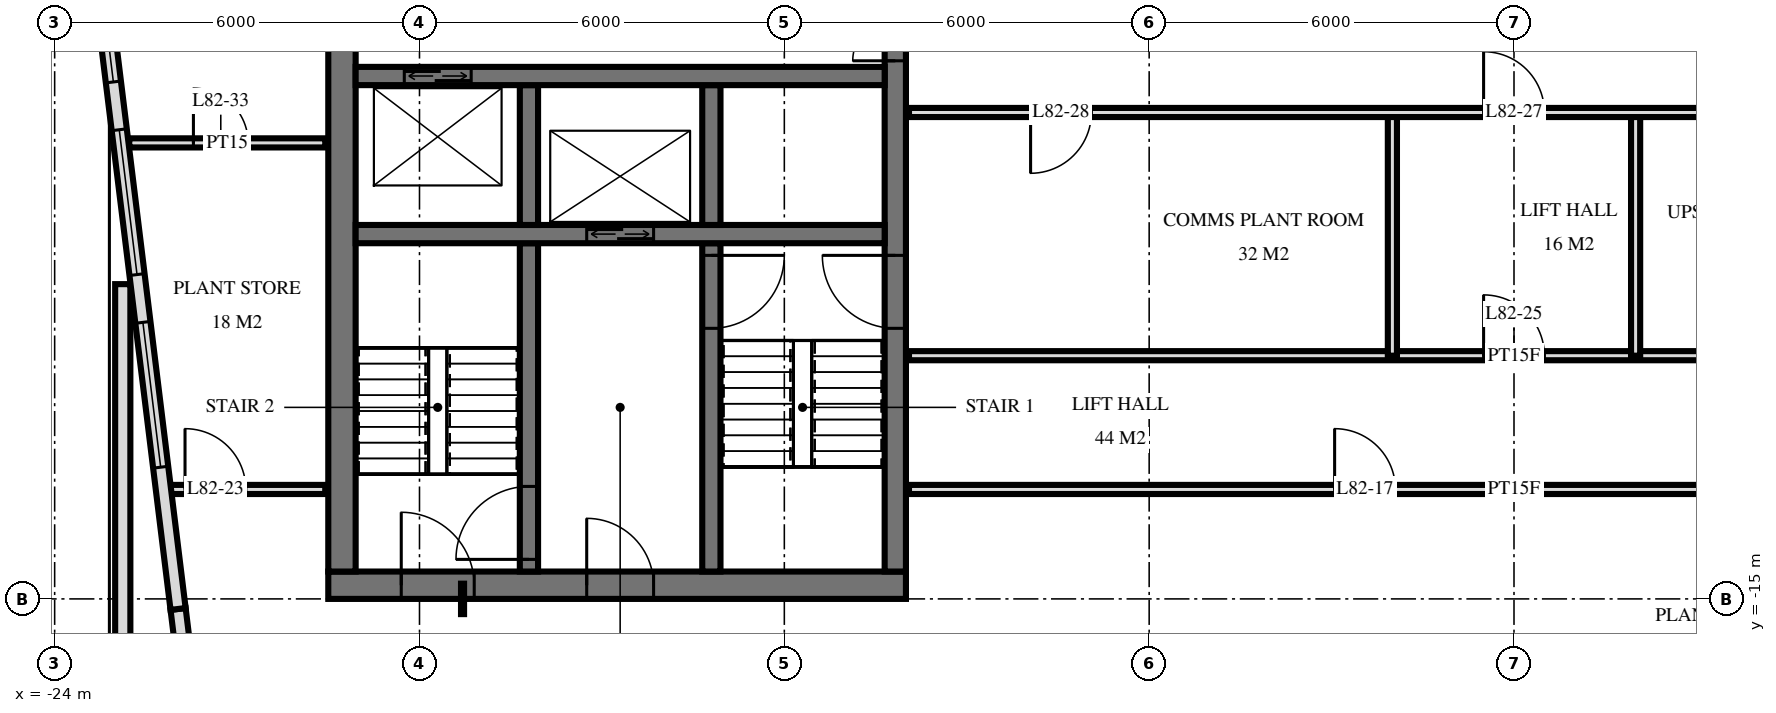
"""IFC4 building model, lengths in metres.
Left out: names, types, materials, properties, quantities, classifications, styles, units other than length and angle.
Written with IfcOpenShell. Run it as: python <this file> out.ifc"""

import sys

from ifc_helpers import new_model, si_unit, direction, frame, frame_2d, origin, place, context, subcontext, project, spatial, rectangle, extrude, element, fill, save


model = new_model("IFC4")
c1 = context("Model", 3, precision=1e-05, world=origin(), true_north=direction((0.0, 1.0)))
c2 = subcontext(c1, "Body", "Model", "MODEL_VIEW")
j1 = project(units=[si_unit("LENGTHUNIT", "METRE"), si_unit("PLANEANGLEUNIT", "RADIAN")], contexts=[c1])
p1 = place(None, origin())
s1 = spatial("IfcSite", under=j1, at=p1, CompositionType="ELEMENT")
p2 = place(p1, origin())
s2 = spatial("IfcBuilding", under=s1, at=p2, CompositionType="ELEMENT")
p3 = place(p2, frame((0.0, 0.0, 308.6)))
s3 = spatial("IfcBuildingStorey", under=s2, at=p3, CompositionType="ELEMENT", Elevation=308.6)
p4 = place(p3, frame((-19.5, -14.775, 0.0), z_axis=(0.0, 0.0, 1.0), x_axis=(1.0, 0.0, 0.0)))
e1 = element("IfcWall", 1, at=p4, inside=s3, PredefinedType="SHEAR", context=c2, shape_type="SweptSolid", body=[
    extrude(rectangle(XDim=9.5, YDim=0.45, at=frame_2d((4.75, 0.0))), origin(), (0.0, 0.0, 1.0), 6.0),
])
p5 = place(p4, frame((1.2, 0.0, 0.0)))
e2 = element("IfcOpeningElement", 2, at=p5, cuts=e1, PredefinedType="OPENING", context=c2, shape_type="SweptSolid", body=[
    extrude(rectangle(XDim=1.2, YDim=2.1, at=frame_2d((0.6, 1.05))), frame((0.0, 0.235, 0.0), z_axis=(0.0, -1.0, 0.0), x_axis=(1.0, 0.0, 0.0)), (0.0, 0.0, 1.0), 0.47),
])
p6 = place(p4, frame((4.25, 0.0, 0.0)))
e3 = element("IfcOpeningElement", 3, at=p6, cuts=e1, PredefinedType="OPENING", context=c2, shape_type="SweptSolid", body=[
    extrude(rectangle(XDim=1.1, YDim=2.1, at=frame_2d((0.55, 1.05))), frame((0.0, 0.235, 0.0), z_axis=(0.0, -1.0, 0.0), x_axis=(1.0, 0.0, 0.0)), (0.0, 0.0, 1.0), 0.47),
])
p7 = place(p3, frame((-10.175, -14.55, 0.0), z_axis=(0.0, 0.0, 1.0), x_axis=(0.0, 1.0, 0.0)))
e4 = element("IfcWall", 4, at=p7, inside=s3, PredefinedType="SHEAR", context=c2, shape_type="SweptSolid", body=[
    extrude(rectangle(XDim=14.1, YDim=0.35, at=frame_2d((7.05, 0.0))), origin(), (0.0, 0.0, 1.0), 6.0),
])
p8 = place(p7, frame((8.4, 0.0, 0.0)))
e5 = element("IfcOpeningElement", 5, at=p8, cuts=e4, PredefinedType="OPENING", context=c2, shape_type="SweptSolid", body=[
    extrude(rectangle(XDim=1.4, YDim=2.4, at=frame_2d((0.7, 1.2))), frame((0.0, 0.185, 0.0), z_axis=(0.0, -1.0, 0.0), x_axis=(1.0, 0.0, 0.0)), (0.0, 0.0, 1.0), 0.37),
])
p9 = place(p7, frame((10.0, 0.0, 0.0)))
e6 = element("IfcOpeningElement", 6, at=p9, cuts=e4, PredefinedType="OPENING", context=c2, shape_type="SweptSolid", body=[
    extrude(rectangle(XDim=1.4, YDim=2.4, at=frame_2d((0.7, 1.2))), frame((0.0, 0.185, 0.0), z_axis=(0.0, -1.0, 0.0), x_axis=(1.0, 0.0, 0.0)), (0.0, 0.0, 1.0), 0.37),
])
p10 = place(p7, frame((4.0, 0.0, 0.0)))
e7 = element("IfcOpeningElement", 7, at=p10, cuts=e4, PredefinedType="OPENING", context=c2, shape_type="SweptSolid", body=[
    extrude(rectangle(XDim=1.2, YDim=2.1, at=frame_2d((0.6, 1.05))), frame((0.0, 0.185, 0.0), z_axis=(0.0, -1.0, 0.0), x_axis=(1.0, 0.0, 0.0)), (0.0, 0.0, 1.0), 0.37),
])
p11 = place(p3, frame((-19.275, -14.55, 0.0), z_axis=(0.0, 0.0, 1.0), x_axis=(0.0, 1.0, 0.0)))
e8 = element("IfcWall", 8, at=p11, inside=s3, PredefinedType="SHEAR", context=c2, shape_type="SweptSolid", body=[
    extrude(rectangle(XDim=14.1, YDim=0.45, at=frame_2d((7.05, 0.0))), origin(), (0.0, 0.0, 1.0), 6.0),
])
p12 = place(p3, frame((-19.05, -6.4, 0.0), z_axis=(0.0, 0.0, 1.0), x_axis=(1.0, 0.0, 0.0)))
e9 = element("IfcWall", 9, at=p12, inside=s3, PredefinedType="SHEAR", context=c2, shape_type="SweptSolid", body=[
    extrude(rectangle(XDim=8.7, YDim=0.3, at=frame_2d((4.35, 0.0))), origin(), (0.0, 0.0, 1.0), 6.0),
])
p13 = place(p12, frame((0.8, 0.0, 0.0)))
e10 = element("IfcOpeningElement", 10, at=p13, cuts=e9, PredefinedType="OPENING", context=c2, shape_type="SweptSolid", body=[
    extrude(rectangle(XDim=1.1, YDim=2.1, at=frame_2d((0.55, 1.05))), frame((0.0, 0.16, 0.0), z_axis=(0.0, -1.0, 0.0), x_axis=(1.0, 0.0, 0.0)), (0.0, 0.0, 1.0), 0.32),
])
p14 = place(p3, frame((-19.05, -9.0, 0.0), z_axis=(0.0, 0.0, 1.0), x_axis=(1.0, 0.0, 0.0)))
e11 = element("IfcWall", 11, at=p14, inside=s3, PredefinedType="SHEAR", context=c2, shape_type="SweptSolid", body=[
    extrude(rectangle(XDim=8.7, YDim=0.3, at=frame_2d((4.35, 0.0))), origin(), (0.0, 0.0, 1.0), 6.0),
])
p15 = place(p14, frame((3.8, 0.0, 0.0)))
e12 = element("IfcOpeningElement", 12, at=p15, cuts=e11, PredefinedType="OPENING", context=c2, shape_type="SweptSolid", body=[
    extrude(rectangle(XDim=1.1, YDim=2.1, at=frame_2d((0.55, 1.05))), frame((0.0, 0.16, 0.0), z_axis=(0.0, -1.0, 0.0), x_axis=(1.0, 0.0, 0.0)), (0.0, 0.0, 1.0), 0.32),
])
p16 = place(p3, frame((-13.2, -8.85, 0.0), z_axis=(0.0, 0.0, 1.0), x_axis=(0.0, 1.0, 0.0)))
e13 = element("IfcWall", 13, at=p16, inside=s3, PredefinedType="SHEAR", context=c2, shape_type="SweptSolid", body=[
    extrude(rectangle(XDim=2.3, YDim=0.3, at=frame_2d((1.15, 0.0))), origin(), (0.0, 0.0, 1.0), 6.0),
])
p17 = place(p3, frame((-13.2, -14.55, 0.0), z_axis=(0.0, 0.0, 1.0), x_axis=(0.0, 1.0, 0.0)))
e14 = element("IfcWall", 14, at=p17, inside=s3, PredefinedType="SHEAR", context=c2, shape_type="SweptSolid", body=[
    extrude(rectangle(XDim=5.4, YDim=0.3, at=frame_2d((2.7, 0.0))), origin(), (0.0, 0.0, 1.0), 6.0),
])
p18 = place(p17, frame((4.0, 0.0, 0.0)))
e15 = element("IfcOpeningElement", 15, at=p18, cuts=e14, PredefinedType="OPENING", context=c2, shape_type="SweptSolid", body=[
    extrude(rectangle(XDim=1.2, YDim=2.1, at=frame_2d((0.6, 1.05))), frame((0.0, 0.16, 0.0), z_axis=(0.0, -1.0, 0.0), x_axis=(1.0, 0.0, 0.0)), (0.0, 0.0, 1.0), 0.32),
])
p19 = place(p3, frame((-16.2, -8.85, 0.0), z_axis=(0.0, 0.0, 1.0), x_axis=(0.0, 1.0, 0.0)))
e16 = element("IfcWall", 16, at=p19, inside=s3, PredefinedType="SHEAR", context=c2, shape_type="SweptSolid", body=[
    extrude(rectangle(XDim=2.3, YDim=0.3, at=frame_2d((1.15, 0.0))), origin(), (0.0, 0.0, 1.0), 6.0),
])
p20 = place(p3, frame((-16.2, -14.55, 0.0), z_axis=(0.0, 0.0, 1.0), x_axis=(0.0, 1.0, 0.0)))
e17 = element("IfcWall", 17, at=p20, inside=s3, PredefinedType="SHEAR", context=c2, shape_type="SweptSolid", body=[
    extrude(rectangle(XDim=5.4, YDim=0.3, at=frame_2d((2.7, 0.0))), origin(), (0.0, 0.0, 1.0), 6.0),
])
p21 = place(p20, frame((0.2, 0.0, 0.0)))
e18 = element("IfcOpeningElement", 18, at=p21, cuts=e17, PredefinedType="OPENING", context=c2, shape_type="SweptSolid", body=[
    extrude(rectangle(XDim=1.2, YDim=2.1, at=frame_2d((0.6, 1.05))), frame((0.0, 0.16, 0.0), z_axis=(0.0, -1.0, 0.0), x_axis=(1.0, 0.0, 0.0)), (0.0, 0.0, 1.0), 0.32),
])
p22 = place(p3, frame((-23.375, -3.723, 0.0), z_axis=(0.0, 0.0, 1.0), x_axis=(0.121852870635, -0.992548174104, 0.0)))
e19 = element("IfcWall", 19, at=p22, inside=s3, PredefinedType="SOLIDWALL", context=c2, shape_type="SweptSolid", body=[
    extrude(rectangle(XDim=11.529, YDim=0.25, at=frame_2d((5.764, 0.0))), origin(), (0.0, 0.0, 1.0), 5.72),
])
p23 = place(p22, frame((0.396, 0.0, 1.005)))
e20 = element("IfcOpeningElement", 20, at=p23, cuts=e19, PredefinedType="OPENING", context=c2, shape_type="SweptSolid", body=[
    extrude(rectangle(XDim=2.4, YDim=3.6, at=frame_2d((1.2, 1.8))), frame((0.0, 0.135, 0.0), z_axis=(0.0, -1.0, 0.0), x_axis=(1.0, 0.0, 0.0)), (0.0, 0.0, 1.0), 0.27),
])
p24 = place(p22, frame((3.588, 0.0, 1.005)))
e21 = element("IfcOpeningElement", 21, at=p24, cuts=e19, PredefinedType="OPENING", context=c2, shape_type="SweptSolid", body=[
    extrude(rectangle(XDim=2.4, YDim=3.6, at=frame_2d((1.2, 1.8))), frame((0.0, 0.135, 0.0), z_axis=(0.0, -1.0, 0.0), x_axis=(1.0, 0.0, 0.0)), (0.0, 0.0, 1.0), 0.27),
])
p25 = place(p22, frame((6.78, 0.0, 1.005)))
e22 = element("IfcOpeningElement", 22, at=p25, cuts=e19, PredefinedType="OPENING", context=c2, shape_type="SweptSolid", body=[
    extrude(rectangle(XDim=2.4, YDim=3.6, at=frame_2d((1.2, 1.8))), frame((0.0, 0.135, 0.0), z_axis=(0.0, -1.0, 0.0), x_axis=(1.0, 0.0, 0.0)), (0.0, 0.0, 1.0), 0.27),
])
p26 = place(p3, frame((-22.88, -29.278, 0.0), z_axis=(0.0, 0.0, 1.0), x_axis=(0.0, 1.0, 0.0)))
e23 = element("IfcWall", 23, at=p26, inside=s3, PredefinedType="PARAPET", context=c2, shape_type="SweptSolid", body=[
    extrude(rectangle(XDim=19.455, YDim=0.25, at=frame_2d((9.728, 0.0))), origin(), (0.0, 0.0, 1.0), 1.1),
])
for number, where, z_axis, x_axis in (
    (24, (2.0, -11.0, 0.0), (0.0, 0.0, 1.0), (0.0, 1.0, 0.0)),
    (25, (-2.0, -11.0, 0.0), (0.0, 0.0, 1.0), (0.0, 1.0, 0.0)),
):
    element("IfcWall", number, at=place(p3, frame(where, z_axis=z_axis, x_axis=x_axis)), inside=s3, PredefinedType="PARTITIONING", context=c2, shape_type="SweptSolid", body=[
        extrude(rectangle(XDim=4.0, YDim=0.15, at=frame_2d((2.0, 0.0))), origin(), (0.0, 0.0, 1.0), 5.7),
    ])
p27 = place(p3, frame((-22.156, -13.2, 0.0), z_axis=(0.0, 0.0, 1.0), x_axis=(1.0, 0.0, 0.0)))
e26 = element("IfcWall", 26, at=p27, inside=s3, PredefinedType="PARTITIONING", context=c2, shape_type="SweptSolid", body=[
    extrude(rectangle(XDim=2.606, YDim=0.15, at=frame_2d((1.303, 0.0))), origin(), (0.0, 0.0, 1.0), 5.7),
])
p28 = place(p27, frame((0.3, 0.0, 0.0)))
e27 = element("IfcOpeningElement", 27, at=p28, cuts=e26, PredefinedType="OPENING", context=c2, shape_type="SweptSolid", body=[
    extrude(rectangle(XDim=1.0, YDim=2.1, at=frame_2d((0.5, 1.05))), frame((0.0, 0.085, 0.0), z_axis=(0.0, -1.0, 0.0), x_axis=(1.0, 0.0, 0.0)), (0.0, 0.0, 1.0), 0.17),
])
p29 = place(p3, frame((-9.95, -13.2, 0.0), z_axis=(0.0, 0.0, 1.0), x_axis=(1.0, 0.0, 0.0)))
e28 = element("IfcWall", 28, at=p29, inside=s3, PredefinedType="PARTITIONING", context=c2, shape_type="SweptSolid", body=[
    extrude(rectangle(XDim=19.9, YDim=0.15, at=frame_2d((9.95, 0.0))), origin(), (0.0, 0.0, 1.0), 5.7),
])
p30 = place(p29, frame((7.0, 0.0, 0.0)))
e29 = element("IfcOpeningElement", 29, at=p30, cuts=e28, PredefinedType="OPENING", context=c2, shape_type="SweptSolid", body=[
    extrude(rectangle(XDim=1.0, YDim=2.1, at=frame_2d((0.5, 1.05))), frame((0.0, 0.085, 0.0), z_axis=(0.0, -1.0, 0.0), x_axis=(1.0, 0.0, 0.0)), (0.0, 0.0, 1.0), 0.17),
])
p31 = place(p3, frame((-9.95, -11.0, 0.0), z_axis=(0.0, 0.0, 1.0), x_axis=(1.0, 0.0, 0.0)))
e30 = element("IfcWall", 30, at=p31, inside=s3, PredefinedType="PARTITIONING", context=c2, shape_type="SweptSolid", body=[
    extrude(rectangle(XDim=19.9, YDim=0.15, at=frame_2d((9.95, 0.0))), origin(), (0.0, 0.0, 1.0), 5.7),
])
p32 = place(p31, frame((9.45, 0.0, 0.0)))
e31 = element("IfcOpeningElement", 31, at=p32, cuts=e30, PredefinedType="OPENING", context=c2, shape_type="SweptSolid", body=[
    extrude(rectangle(XDim=1.0, YDim=2.1, at=frame_2d((0.5, 1.05))), frame((0.0, 0.085, 0.0), z_axis=(0.0, -1.0, 0.0), x_axis=(1.0, 0.0, 0.0)), (0.0, 0.0, 1.0), 0.17),
])
p33 = place(p31, frame((15.45, 0.0, 0.0)))
e32 = element("IfcOpeningElement", 32, at=p33, cuts=e30, PredefinedType="OPENING", context=c2, shape_type="SweptSolid", body=[
    extrude(rectangle(XDim=1.0, YDim=2.1, at=frame_2d((0.5, 1.05))), frame((0.0, 0.085, 0.0), z_axis=(0.0, -1.0, 0.0), x_axis=(1.0, 0.0, 0.0)), (0.0, 0.0, 1.0), 0.17),
])
p34 = place(p3, frame((-22.773, -7.5, 0.0), z_axis=(0.0, 0.0, 1.0), x_axis=(1.0, 0.0, 0.0)))
e33 = element("IfcWall", 33, at=p34, inside=s3, PredefinedType="PARTITIONING", context=c2, shape_type="SweptSolid", body=[
    extrude(rectangle(XDim=3.223, YDim=0.15, at=frame_2d((1.612, 0.0))), origin(), (0.0, 0.0, 1.0), 5.7),
])
p35 = place(p34, frame((1.055, 0.0, 0.0)))
e34 = element("IfcOpeningElement", 34, at=p35, cuts=e33, PredefinedType="OPENING", context=c2, shape_type="SweptSolid", body=[
    extrude(rectangle(XDim=0.9, YDim=2.1, at=frame_2d((0.45, 1.05))), frame((0.0, 0.085, 0.0), z_axis=(0.0, -1.0, 0.0), x_axis=(1.0, 0.0, 0.0)), (0.0, 0.0, 1.0), 0.17),
])
p36 = place(p3, frame((-9.95, -7.0, 0.0), z_axis=(0.0, 0.0, 1.0), x_axis=(1.0, 0.0, 0.0)))
e35 = element("IfcWall", 35, at=p36, inside=s3, PredefinedType="PARTITIONING", context=c2, shape_type="SweptSolid", body=[
    extrude(rectangle(XDim=19.9, YDim=0.15, at=frame_2d((9.95, 0.0))), origin(), (0.0, 0.0, 1.0), 5.7),
])
p37 = place(p36, frame((9.45, 0.0, 0.0)))
e36 = element("IfcOpeningElement", 36, at=p37, cuts=e35, PredefinedType="OPENING", context=c2, shape_type="SweptSolid", body=[
    extrude(rectangle(XDim=1.0, YDim=2.1, at=frame_2d((0.5, 1.05))), frame((0.0, 0.085, 0.0), z_axis=(0.0, -1.0, 0.0), x_axis=(1.0, 0.0, 0.0)), (0.0, 0.0, 1.0), 0.17),
])
p38 = place(p36, frame((2.0, 0.0, 0.0)))
e37 = element("IfcOpeningElement", 37, at=p38, cuts=e35, PredefinedType="OPENING", context=c2, shape_type="SweptSolid", body=[
    extrude(rectangle(XDim=1.0, YDim=2.1, at=frame_2d((0.5, 1.05))), frame((0.0, 0.085, 0.0), z_axis=(0.0, -1.0, 0.0), x_axis=(1.0, 0.0, 0.0)), (0.0, 0.0, 1.0), 0.17),
])
p39 = place(p3, frame((-21.97, -15.166, 0.0), z_axis=(0.0, 0.0, 1.0), x_axis=(0.121935848955, -0.992537983525, 0.0)))
e38 = element("IfcWall", 38, at=p39, inside=s3, PredefinedType="SOLIDWALL", context=c2, shape_type="SweptSolid", body=[
    extrude(rectangle(XDim=2.463, YDim=0.25, at=frame_2d((1.231, 0.0))), origin(), (0.0, 0.0, 1.0), 5.176),
])
p40 = place(p39, frame((0.541, 0.0, 0.0)))
e39 = element("IfcOpeningElement", 39, at=p40, cuts=e38, PredefinedType="OPENING", context=c2, shape_type="SweptSolid", body=[
    extrude(rectangle(XDim=1.8, YDim=2.4, at=frame_2d((0.9, 1.2))), frame((0.0, 0.135, 0.0), z_axis=(0.0, -1.0, 0.0), x_axis=(1.0, 0.0, 0.0)), (0.0, 0.0, 1.0), 0.27),
])
p41 = place(p23, origin())
e40 = element("IfcWindow", 40, at=p41, inside=s3, PartitioningType="SINGLE_PANEL", PredefinedType="USERDEFINED", context=c2, shape_type="SweptSolid", body=[
    extrude(rectangle(XDim=2.4, YDim=3.6, at=frame_2d((1.2, 1.8))), frame((0.0, 0.03, 0.0), z_axis=(0.0, -1.0, 0.0), x_axis=(1.0, 0.0, 0.0)), (0.0, 0.0, 1.0), 0.06),
])
fill(e20, e40)
p42 = place(p24, origin())
e41 = element("IfcWindow", 41, at=p42, inside=s3, PartitioningType="SINGLE_PANEL", PredefinedType="USERDEFINED", context=c2, shape_type="SweptSolid", body=[
    extrude(rectangle(XDim=2.4, YDim=3.6, at=frame_2d((1.2, 1.8))), frame((0.0, 0.03, 0.0), z_axis=(0.0, -1.0, 0.0), x_axis=(1.0, 0.0, 0.0)), (0.0, 0.0, 1.0), 0.06),
])
fill(e21, e41)
p43 = place(p25, origin())
e42 = element("IfcWindow", 42, at=p43, inside=s3, PartitioningType="SINGLE_PANEL", PredefinedType="USERDEFINED", context=c2, shape_type="SweptSolid", body=[
    extrude(rectangle(XDim=2.4, YDim=3.6, at=frame_2d((1.2, 1.8))), frame((0.0, 0.03, 0.0), z_axis=(0.0, -1.0, 0.0), x_axis=(1.0, 0.0, 0.0)), (0.0, 0.0, 1.0), 0.06),
])
fill(e22, e42)
p44 = place(p15, origin())
e43 = element("IfcDoor", 43, at=p44, inside=s3, OperationType="DOUBLE_DOOR_SLIDING", PredefinedType="USERDEFINED", context=c2, shape_type="SweptSolid", body=[
    extrude(rectangle(XDim=1.1, YDim=2.1, at=frame_2d((0.55, 1.05))), frame((0.0, 0.025, 0.0), z_axis=(0.0, -1.0, 0.0), x_axis=(1.0, 0.0, 0.0)), (0.0, 0.0, 1.0), 0.05),
])
fill(e12, e43)
p45 = place(p13, origin())
e44 = element("IfcDoor", 44, at=p45, inside=s3, OperationType="DOUBLE_DOOR_SLIDING", PredefinedType="USERDEFINED", context=c2, shape_type="SweptSolid", body=[
    extrude(rectangle(XDim=1.1, YDim=2.1, at=frame_2d((0.55, 1.05))), frame((0.0, 0.025, 0.0), z_axis=(0.0, -1.0, 0.0), x_axis=(1.0, 0.0, 0.0)), (0.0, 0.0, 1.0), 0.05),
])
fill(e10, e44)
p46 = place(p8, origin())
e45 = element("IfcDoor", 45, at=p46, inside=s3, OperationType="DOUBLE_DOOR_SINGLE_SWING", PredefinedType="DOOR", context=c2, shape_type="SweptSolid", body=[
    extrude(rectangle(XDim=1.4, YDim=2.4, at=frame_2d((0.7, 1.2))), frame((0.0, 0.025, 0.0), z_axis=(0.0, -1.0, 0.0), x_axis=(1.0, 0.0, 0.0)), (0.0, 0.0, 1.0), 0.05),
])
fill(e5, e45)
p47 = place(p10, origin())
e46 = element("IfcDoor", 46, at=p47, inside=s3, OperationType="SINGLE_SWING_LEFT", PredefinedType="DOOR", context=c2, shape_type="SweptSolid", body=[
    extrude(rectangle(XDim=1.2, YDim=2.1, at=frame_2d((0.6, 1.05))), frame((0.0, 0.025, 0.0), z_axis=(0.0, -1.0, 0.0), x_axis=(1.0, 0.0, 0.0)), (0.0, 0.0, 1.0), 0.05),
])
fill(e7, e46)
p48 = place(p5, origin())
e47 = element("IfcDoor", 47, at=p48, inside=s3, OperationType="SINGLE_SWING_RIGHT", PredefinedType="DOOR", context=c2, shape_type="SweptSolid", body=[
    extrude(rectangle(XDim=1.2, YDim=2.1, at=frame_2d((0.6, 1.05))), frame((0.0, 0.105, 0.0), z_axis=(0.0, -1.0, 0.0), x_axis=(1.0, 0.0, 0.0)), (0.0, 0.0, 1.0), 0.05),
])
fill(e2, e47)
p49 = place(p6, origin())
e48 = element("IfcDoor", 48, at=p49, inside=s3, OperationType="SINGLE_SWING_RIGHT", PredefinedType="DOOR", context=c2, shape_type="SweptSolid", body=[
    extrude(rectangle(XDim=1.1, YDim=2.1, at=frame_2d((0.55, 1.05))), frame((0.0, 0.025, 0.0), z_axis=(0.0, -1.0, 0.0), x_axis=(1.0, 0.0, 0.0)), (0.0, 0.0, 1.0), 0.05),
])
fill(e3, e48)
p50 = place(p18, frame((0.6, 0.0, 0.0), z_axis=(0.0, 0.0, 1.0), x_axis=(-1.0, 0.0, 0.0)))
e49 = element("IfcDoor", 49, at=p50, inside=s3, OperationType="SINGLE_SWING_RIGHT", PredefinedType="DOOR", context=c2, shape_type="SweptSolid", body=[
    extrude(rectangle(XDim=1.2, YDim=2.1, at=frame_2d((0.0, 1.05))), frame((0.0, -0.025, 0.0), z_axis=(0.0, 1.0, 0.0), x_axis=(-1.0, 0.0, 0.0)), (0.0, 0.0, 1.0), 0.05),
])
fill(e15, e49)
p51 = place(p21, origin())
e50 = element("IfcDoor", 50, at=p51, inside=s3, OperationType="SINGLE_SWING_RIGHT", PredefinedType="DOOR", context=c2, shape_type="SweptSolid", body=[
    extrude(rectangle(XDim=1.2, YDim=2.1, at=frame_2d((0.6, 1.05))), frame((0.0, 0.025, 0.0), z_axis=(0.0, -1.0, 0.0), x_axis=(1.0, 0.0, 0.0)), (0.0, 0.0, 1.0), 0.05),
])
fill(e18, e50)
p52 = place(p30, origin())
e51 = element("IfcDoor", 51, at=p52, inside=s3, OperationType="SINGLE_SWING_RIGHT", PredefinedType="DOOR", context=c2, shape_type="SweptSolid", body=[
    extrude(rectangle(XDim=1.0, YDim=2.1, at=frame_2d((0.5, 1.05))), frame((0.0, 0.025, 0.0), z_axis=(0.0, -1.0, 0.0), x_axis=(1.0, 0.0, 0.0)), (0.0, 0.0, 1.0), 0.05),
])
fill(e29, e51)
p53 = place(p28, origin())
e52 = element("IfcDoor", 52, at=p53, inside=s3, OperationType="SINGLE_SWING_RIGHT", PredefinedType="DOOR", context=c2, shape_type="SweptSolid", body=[
    extrude(rectangle(XDim=1.0, YDim=2.1, at=frame_2d((0.5, 1.05))), frame((0.0, 0.025, 0.0), z_axis=(0.0, -1.0, 0.0), x_axis=(1.0, 0.0, 0.0)), (0.0, 0.0, 1.0), 0.05),
])
fill(e27, e52)
p54 = place(p32, origin())
e53 = element("IfcDoor", 53, at=p54, inside=s3, OperationType="SINGLE_SWING_RIGHT", PredefinedType="DOOR", context=c2, shape_type="SweptSolid", body=[
    extrude(rectangle(XDim=1.0, YDim=2.1, at=frame_2d((0.5, 1.05))), frame((0.0, 0.025, 0.0), z_axis=(0.0, -1.0, 0.0), x_axis=(1.0, 0.0, 0.0)), (0.0, 0.0, 1.0), 0.05),
])
fill(e31, e53)
p55 = place(p37, origin())
e54 = element("IfcDoor", 54, at=p55, inside=s3, OperationType="SINGLE_SWING_RIGHT", PredefinedType="DOOR", context=c2, shape_type="SweptSolid", body=[
    extrude(rectangle(XDim=1.0, YDim=2.1, at=frame_2d((0.5, 1.05))), frame((0.0, 0.025, 0.0), z_axis=(0.0, -1.0, 0.0), x_axis=(1.0, 0.0, 0.0)), (0.0, 0.0, 1.0), 0.05),
])
fill(e36, e54)
p56 = place(p38, frame((0.5, 0.0, 0.0), z_axis=(0.0, 0.0, 1.0), x_axis=(-1.0, 0.0, 0.0)))
e55 = element("IfcDoor", 55, at=p56, inside=s3, OperationType="SINGLE_SWING_LEFT", PredefinedType="DOOR", context=c2, shape_type="SweptSolid", body=[
    extrude(rectangle(XDim=1.0, YDim=2.1, at=frame_2d((0.0, 1.05))), frame((0.0, -0.025, 0.0), z_axis=(0.0, 1.0, 0.0), x_axis=(-1.0, 0.0, 0.0)), (0.0, 0.0, 1.0), 0.05),
])
fill(e37, e55)
p57 = place(p35, origin())
e56 = element("IfcDoor", 56, at=p57, inside=s3, OperationType="SINGLE_SWING_RIGHT", PredefinedType="DOOR", context=c2, shape_type="SweptSolid", body=[
    extrude(rectangle(XDim=0.9, YDim=2.1, at=frame_2d((0.45, 1.05))), frame((0.0, 0.025, 0.0), z_axis=(0.0, -1.0, 0.0), x_axis=(1.0, 0.0, 0.0)), (0.0, 0.0, 1.0), 0.05),
])
fill(e34, e56)
save(model, sys.argv[1])
